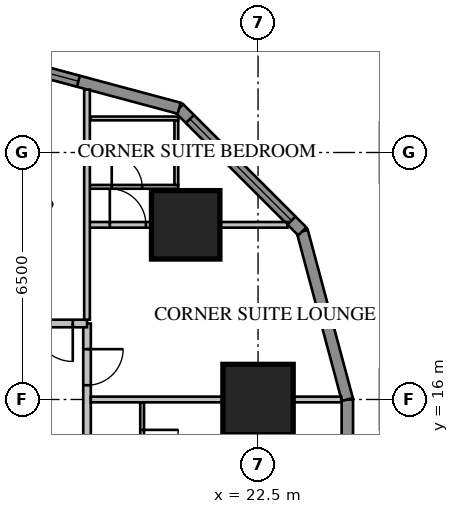
"""IFC4 building model, lengths in metres.
Left out: names, types, materials, properties, quantities, classifications, styles, units other than length and angle.
Written with IfcOpenShell. Run it as: python <this file> out.ifc"""

import sys

from ifc_helpers import new_model, si_unit, direction, frame, frame_2d, origin, origin_2d, place, context, subcontext, project, spatial, rectangle, extrude, element, fill, save


model = new_model("IFC4")
c1 = context("Model", 3, precision=1e-05, world=origin(), true_north=direction((0.0, 1.0)))
c2 = subcontext(c1, "Body", "Model", "MODEL_VIEW")
j1 = project(units=[si_unit("LENGTHUNIT", "METRE"), si_unit("PLANEANGLEUNIT", "RADIAN")], contexts=[c1])
p1 = place(None, origin())
s1 = spatial("IfcSite", under=j1, at=p1, CompositionType="ELEMENT")
p2 = place(p1, origin())
s2 = spatial("IfcBuilding", under=s1, at=p2, CompositionType="ELEMENT")
p3 = place(p2, frame((0.0, 0.0, 35.25)))
s3 = spatial("IfcBuildingStorey", under=s2, at=p3, CompositionType="ELEMENT", Elevation=35.25)
p4 = place(p3, frame((22.5, 16.0, 0.0), z_axis=(0.0, 0.0, 1.0), x_axis=(1.0, 0.0, 0.0)))
e1 = element("IfcColumn", 1, at=p4, inside=s3, PredefinedType="COLUMN", context=c2, shape_type="SweptSolid", body=[
    extrude(rectangle(XDim=1.85, YDim=1.85, at=origin_2d()), origin(), (0.0, 0.0, 1.0), 3.85),
])
p5 = place(p3, frame((20.596, 20.596, 0.0), z_axis=(0.0, 0.0, 1.0), x_axis=(1.0, 0.0, 0.0)))
e2 = element("IfcColumn", 2, at=p5, inside=s3, PredefinedType="COLUMN", context=c2, shape_type="SweptSolid", body=[
    extrude(rectangle(XDim=1.8, YDim=1.8, at=origin_2d()), origin(), (0.0, 0.0, 1.0), 3.85),
])
p6 = place(p3, frame((24.85, -16.0, 0.0), z_axis=(0.0, 0.0, 1.0), x_axis=(0.0, 1.0, 0.0)))
e3 = element("IfcWall", 3, at=p6, inside=s3, PredefinedType="SOLIDWALL", context=c2, shape_type="SweptSolid", body=[
    extrude(rectangle(XDim=32.0, YDim=0.3, at=frame_2d((16.0, 0.0))), origin(), (0.0, 0.0, 1.0), 3.65),
])
p7 = place(p6, frame((1.2, 0.0, 0.75)))
e4 = element("IfcOpeningElement", 4, at=p7, cuts=e3, PredefinedType="OPENING", context=c2, shape_type="SweptSolid", body=[
    extrude(rectangle(XDim=1.6, YDim=1.8, at=frame_2d((0.8, 0.9))), frame((0.0, 0.17, 0.0), z_axis=(0.0, -1.0, 0.0), x_axis=(1.0, 0.0, 0.0)), (0.0, 0.0, 1.0), 0.34),
])
p8 = place(p6, frame((5.2, 0.0, 0.75)))
e5 = element("IfcOpeningElement", 5, at=p8, cuts=e3, PredefinedType="OPENING", context=c2, shape_type="SweptSolid", body=[
    extrude(rectangle(XDim=1.6, YDim=1.8, at=frame_2d((0.8, 0.9))), frame((0.0, 0.17, 0.0), z_axis=(0.0, -1.0, 0.0), x_axis=(1.0, 0.0, 0.0)), (0.0, 0.0, 1.0), 0.34),
])
p9 = place(p6, frame((17.2, 0.0, 0.75)))
e6 = element("IfcOpeningElement", 6, at=p9, cuts=e3, PredefinedType="OPENING", context=c2, shape_type="SweptSolid", body=[
    extrude(rectangle(XDim=1.6, YDim=1.8, at=frame_2d((0.8, 0.9))), frame((0.0, 0.17, 0.0), z_axis=(0.0, -1.0, 0.0), x_axis=(1.0, 0.0, 0.0)), (0.0, 0.0, 1.0), 0.34),
])
p10 = place(p6, frame((21.2, 0.0, 0.75)))
e7 = element("IfcOpeningElement", 7, at=p10, cuts=e3, PredefinedType="OPENING", context=c2, shape_type="SweptSolid", body=[
    extrude(rectangle(XDim=1.6, YDim=1.8, at=frame_2d((0.8, 0.9))), frame((0.0, 0.17, 0.0), z_axis=(0.0, -1.0, 0.0), x_axis=(1.0, 0.0, 0.0)), (0.0, 0.0, 1.0), 0.34),
])
p11 = place(p6, frame((25.2, 0.0, 0.75)))
e8 = element("IfcOpeningElement", 8, at=p11, cuts=e3, PredefinedType="OPENING", context=c2, shape_type="SweptSolid", body=[
    extrude(rectangle(XDim=1.6, YDim=1.8, at=frame_2d((0.8, 0.9))), frame((0.0, 0.17, 0.0), z_axis=(0.0, -1.0, 0.0), x_axis=(1.0, 0.0, 0.0)), (0.0, 0.0, 1.0), 0.34),
])
p12 = place(p6, frame((29.2, 0.0, 0.75)))
e9 = element("IfcOpeningElement", 9, at=p12, cuts=e3, PredefinedType="OPENING", context=c2, shape_type="SweptSolid", body=[
    extrude(rectangle(XDim=1.6, YDim=1.8, at=frame_2d((0.8, 0.9))), frame((0.0, 0.17, 0.0), z_axis=(0.0, -1.0, 0.0), x_axis=(1.0, 0.0, 0.0)), (0.0, 0.0, 1.0), 0.34),
])
p13 = place(p6, frame((8.8, 0.0, 0.75)))
e10 = element("IfcOpeningElement", 10, at=p13, cuts=e3, PredefinedType="OPENING", context=c2, shape_type="SweptSolid", body=[
    extrude(rectangle(XDim=2.4, YDim=1.8, at=frame_2d((1.2, 0.9))), frame((0.0, 0.17, 0.0), z_axis=(0.0, -1.0, 0.0), x_axis=(1.0, 0.0, 0.0)), (0.0, 0.0, 1.0), 0.34),
])
p14 = place(p6, frame((13.812, 0.0, 0.0)))
e11 = element("IfcOpeningElement", 11, at=p14, cuts=e3, PredefinedType="OPENING", context=c2, shape_type="SweptSolid", body=[
    extrude(rectangle(XDim=1.0, YDim=2.4, at=frame_2d((0.5, 1.2))), frame((0.0, 0.17, 0.0), z_axis=(0.0, -1.0, 0.0), x_axis=(1.0, 0.0, 0.0)), (0.0, 0.0, 1.0), 0.34),
])
p15 = place(p3, frame((24.85, 16.0, 0.0), z_axis=(0.0, 0.0, 1.0), x_axis=(-0.258839972501, 0.965920218567, 0.0)))
e12 = element("IfcWall", 12, at=p15, inside=s3, PredefinedType="SOLIDWALL", context=c2, shape_type="SweptSolid", body=[
    extrude(rectangle(XDim=4.581, YDim=0.3, at=frame_2d((2.291, 0.0))), origin(), (0.0, 0.0, 1.0), 3.65),
])
p16 = place(p3, frame((23.664, 20.425, 0.0), z_axis=(0.0, 0.0, 1.0), x_axis=(-0.707106781187, 0.707106781187, 0.0)))
e13 = element("IfcWall", 13, at=p16, inside=s3, PredefinedType="SOLIDWALL", context=c2, shape_type="SweptSolid", body=[
    extrude(rectangle(XDim=4.581, YDim=0.3, at=frame_2d((2.291, 0.0))), origin(), (0.0, 0.0, 1.0), 3.65),
])
p17 = place(p16, frame((0.4, 0.0, 0.75)))
e14 = element("IfcOpeningElement", 14, at=p17, cuts=e13, PredefinedType="OPENING", context=c2, shape_type="SweptSolid", body=[
    extrude(rectangle(XDim=3.781, YDim=1.8, at=frame_2d((1.891, 0.9))), frame((0.0, 0.17, 0.0), z_axis=(0.0, -1.0, 0.0), x_axis=(1.0, 0.0, 0.0)), (0.0, 0.0, 1.0), 0.34),
])
p18 = place(p3, frame((20.425, 23.664, 0.0), z_axis=(0.0, 0.0, 1.0), x_axis=(-0.965920218567, 0.258839972501, 0.0)))
e15 = element("IfcWall", 15, at=p18, inside=s3, PredefinedType="SOLIDWALL", context=c2, shape_type="SweptSolid", body=[
    extrude(rectangle(XDim=4.581, YDim=0.3, at=frame_2d((2.291, 0.0))), origin(), (0.0, 0.0, 1.0), 3.65),
])
p19 = place(p18, frame((2.746, 0.0, 0.75)))
e16 = element("IfcOpeningElement", 16, at=p19, cuts=e15, PredefinedType="OPENING", context=c2, shape_type="SweptSolid", body=[
    extrude(rectangle(XDim=1.6, YDim=1.8, at=frame_2d((0.8, 0.9))), frame((0.0, 0.17, 0.0), z_axis=(0.0, -1.0, 0.0), x_axis=(1.0, 0.0, 0.0)), (0.0, 0.0, 1.0), 0.34),
])
p20 = place(p3, frame((18.0, -18.0, 0.0), z_axis=(0.0, 0.0, 1.0), x_axis=(0.0, 1.0, 0.0)))
e17 = element("IfcWall", 17, at=p20, inside=s3, PredefinedType="PARTITIONING", context=c2, shape_type="SweptSolid", body=[
    extrude(rectangle(XDim=36.0, YDim=0.2, at=frame_2d((18.0, 0.0))), origin(), (0.0, 0.0, 1.0), 3.65),
])
p21 = place(p20, frame((10.4, 0.0, 0.0)))
e18 = element("IfcOpeningElement", 18, at=p21, cuts=e17, PredefinedType="OPENING", context=c2, shape_type="SweptSolid", body=[
    extrude(rectangle(XDim=1.0, YDim=2.1, at=frame_2d((0.5, 1.05))), frame((0.0, 0.12, 0.0), z_axis=(0.0, -1.0, 0.0), x_axis=(1.0, 0.0, 0.0)), (0.0, 0.0, 1.0), 0.24),
])
p22 = place(p20, frame((0.375, 0.0, 0.0)))
e19 = element("IfcOpeningElement", 19, at=p22, cuts=e17, PredefinedType="OPENING", context=c2, shape_type="SweptSolid", body=[
    extrude(rectangle(XDim=1.0, YDim=2.1, at=frame_2d((0.5, 1.05))), frame((0.0, 0.12, 0.0), z_axis=(0.0, -1.0, 0.0), x_axis=(1.0, 0.0, 0.0)), (0.0, 0.0, 1.0), 0.24),
])
p23 = place(p20, frame((34.375, 0.0, 0.0)))
e20 = element("IfcOpeningElement", 20, at=p23, cuts=e17, PredefinedType="OPENING", context=c2, shape_type="SweptSolid", body=[
    extrude(rectangle(XDim=0.95, YDim=2.1, at=frame_2d((0.475, 1.05))), frame((0.0, 0.12, 0.0), z_axis=(0.0, -1.0, 0.0), x_axis=(1.0, 0.0, 0.0)), (0.0, 0.0, 1.0), 0.24),
])
p24 = place(p3, frame((19.45, -15.925, 0.0), z_axis=(0.0, 0.0, 1.0), x_axis=(0.0, 1.0, 0.0)))
e21 = element("IfcWall", 21, at=p24, inside=s3, PredefinedType="PARTITIONING", context=c2, shape_type="SweptSolid", body=[
    extrude(rectangle(XDim=31.85, YDim=0.1, at=frame_2d((15.925, 0.0))), origin(), (0.0, 0.0, 1.0), 3.65),
])
p25 = place(p24, frame((10.125, 0.0, 0.0)))
e22 = element("IfcOpeningElement", 22, at=p25, cuts=e21, PredefinedType="OPENING", context=c2, shape_type="SweptSolid", body=[
    extrude(rectangle(XDim=1.0, YDim=2.1, at=frame_2d((0.5, 1.05))), frame((0.0, 0.07, 0.0), z_axis=(0.0, -1.0, 0.0), x_axis=(1.0, 0.0, 0.0)), (0.0, 0.0, 1.0), 0.14),
])
p26 = place(p24, frame((8.3, 0.0, 0.0)))
e23 = element("IfcOpeningElement", 23, at=p26, cuts=e21, PredefinedType="OPENING", context=c2, shape_type="SweptSolid", body=[
    extrude(rectangle(XDim=0.8, YDim=2.1, at=frame_2d((0.4, 1.05))), frame((0.0, 0.07, 0.0), z_axis=(0.0, -1.0, 0.0), x_axis=(1.0, 0.0, 0.0)), (0.0, 0.0, 1.0), 0.14),
])
p27 = place(p24, frame((0.3, 0.0, 0.0)))
e24 = element("IfcOpeningElement", 24, at=p27, cuts=e21, PredefinedType="OPENING", context=c2, shape_type="SweptSolid", body=[
    extrude(rectangle(XDim=0.95, YDim=2.1, at=frame_2d((0.475, 1.05))), frame((0.0, 0.07, 0.0), z_axis=(0.0, -1.0, 0.0), x_axis=(1.0, 0.0, 0.0)), (0.0, 0.0, 1.0), 0.14),
])
p28 = place(p24, frame((6.175, 0.0, 0.0)))
e25 = element("IfcOpeningElement", 25, at=p28, cuts=e21, PredefinedType="OPENING", context=c2, shape_type="SweptSolid", body=[
    extrude(rectangle(XDim=0.95, YDim=2.1, at=frame_2d((0.475, 1.05))), frame((0.0, 0.07, 0.0), z_axis=(0.0, -1.0, 0.0), x_axis=(1.0, 0.0, 0.0)), (0.0, 0.0, 1.0), 0.14),
])
p29 = place(p24, frame((16.3, 0.0, 0.0)))
e26 = element("IfcOpeningElement", 26, at=p29, cuts=e21, PredefinedType="OPENING", context=c2, shape_type="SweptSolid", body=[
    extrude(rectangle(XDim=0.95, YDim=2.1, at=frame_2d((0.475, 1.05))), frame((0.0, 0.07, 0.0), z_axis=(0.0, -1.0, 0.0), x_axis=(1.0, 0.0, 0.0)), (0.0, 0.0, 1.0), 0.14),
])
p30 = place(p24, frame((22.175, 0.0, 0.0)))
e27 = element("IfcOpeningElement", 27, at=p30, cuts=e21, PredefinedType="OPENING", context=c2, shape_type="SweptSolid", body=[
    extrude(rectangle(XDim=0.95, YDim=2.1, at=frame_2d((0.475, 1.05))), frame((0.0, 0.07, 0.0), z_axis=(0.0, -1.0, 0.0), x_axis=(1.0, 0.0, 0.0)), (0.0, 0.0, 1.0), 0.14),
])
p31 = place(p24, frame((24.3, 0.0, 0.0)))
e28 = element("IfcOpeningElement", 28, at=p31, cuts=e21, PredefinedType="OPENING", context=c2, shape_type="SweptSolid", body=[
    extrude(rectangle(XDim=0.95, YDim=2.1, at=frame_2d((0.475, 1.05))), frame((0.0, 0.07, 0.0), z_axis=(0.0, -1.0, 0.0), x_axis=(1.0, 0.0, 0.0)), (0.0, 0.0, 1.0), 0.14),
])
p32 = place(p24, frame((30.175, 0.0, 0.0)))
e29 = element("IfcOpeningElement", 29, at=p32, cuts=e21, PredefinedType="OPENING", context=c2, shape_type="SweptSolid", body=[
    extrude(rectangle(XDim=0.95, YDim=2.1, at=frame_2d((0.475, 1.05))), frame((0.0, 0.07, 0.0), z_axis=(0.0, -1.0, 0.0), x_axis=(1.0, 0.0, 0.0)), (0.0, 0.0, 1.0), 0.14),
])
p33 = place(p3, frame((18.1, 16.0, 0.0), z_axis=(0.0, 0.0, 1.0), x_axis=(1.0, 0.0, 0.0)))
e30 = element("IfcWall", 30, at=p33, inside=s3, PredefinedType="PARTITIONING", context=c2, shape_type="SweptSolid", body=[
    extrude(rectangle(XDim=6.589, YDim=0.15, at=frame_2d((3.295, 0.0))), origin(), (0.0, 0.0, 1.0), 3.65),
])
p34 = place(p3, frame((18.065, 21.596, 0.0), z_axis=(0.0, 0.0, 1.0), x_axis=(1.0, 0.0, 0.0)))
e31 = element("IfcWall", 31, at=p34, inside=s3, PredefinedType="PARTITIONING", context=c2, shape_type="SweptSolid", body=[
    extrude(rectangle(XDim=2.335, YDim=0.1, at=frame_2d((1.167, 0.0))), origin(), (0.0, 0.0, 1.0), 3.65),
])
p35 = place(p34, frame((0.585, 0.0, 0.0)))
e32 = element("IfcOpeningElement", 32, at=p35, cuts=e31, PredefinedType="OPENING", context=c2, shape_type="SweptSolid", body=[
    extrude(rectangle(XDim=0.8, YDim=2.1, at=frame_2d((0.4, 1.05))), frame((0.0, 0.07, 0.0), z_axis=(0.0, -1.0, 0.0), x_axis=(1.0, 0.0, 0.0)), (0.0, 0.0, 1.0), 0.14),
])
p36 = place(p3, frame((20.35, 21.646, 0.0), z_axis=(0.0, 0.0, 1.0), x_axis=(0.0, 1.0, 0.0)))
e33 = element("IfcWall", 33, at=p36, inside=s3, PredefinedType="PARTITIONING", context=c2, shape_type="SweptSolid", body=[
    extrude(rectangle(XDim=1.7, YDim=0.1, at=frame_2d((0.85, 0.0))), origin(), (0.0, 0.0, 1.0), 3.65),
])
p37 = place(p3, frame((18.1, 23.396, 0.0), z_axis=(0.0, 0.0, 1.0), x_axis=(1.0, 0.0, 0.0)))
e34 = element("IfcWall", 34, at=p37, inside=s3, PredefinedType="PARTITIONING", context=c2, shape_type="SweptSolid", body=[
    extrude(rectangle(XDim=2.3, YDim=0.1, at=frame_2d((1.15, 0.0))), origin(), (0.0, 0.0, 1.0), 3.65),
])
p38 = place(p3, frame((18.065, 20.596, 0.0), z_axis=(0.0, 0.0, 1.0), x_axis=(1.0, 0.0, 0.0)))
e35 = element("IfcWall", 35, at=p38, inside=s3, PredefinedType="PARTITIONING", context=c2, shape_type="SweptSolid", body=[
    extrude(rectangle(XDim=5.209, YDim=0.15, at=frame_2d((2.604, 0.0))), origin(), (0.0, 0.0, 1.0), 3.65),
])
p39 = place(p38, frame((0.535, 0.0, 0.0)))
e36 = element("IfcOpeningElement", 36, at=p39, cuts=e35, PredefinedType="OPENING", context=c2, shape_type="SweptSolid", body=[
    extrude(rectangle(XDim=0.95, YDim=2.1, at=frame_2d((0.475, 1.05))), frame((0.0, 0.095, 0.0), z_axis=(0.0, -1.0, 0.0), x_axis=(1.0, 0.0, 0.0)), (0.0, 0.0, 1.0), 0.19),
])
p40 = place(p3, frame((18.0, 18.0, 0.0), z_axis=(0.0, 0.0, 1.0), x_axis=(-1.0, 0.0, 0.0)))
e37 = element("IfcWall", 37, at=p40, inside=s3, PredefinedType="PARTITIONING", context=c2, shape_type="SweptSolid", body=[
    extrude(rectangle(XDim=36.0, YDim=0.2, at=frame_2d((18.0, 0.0))), origin(), (0.0, 0.0, 1.0), 3.65),
])
p41 = place(p40, frame((10.4, 0.0, 0.0)))
e38 = element("IfcOpeningElement", 38, at=p41, cuts=e37, PredefinedType="OPENING", context=c2, shape_type="SweptSolid", body=[
    extrude(rectangle(XDim=1.0, YDim=2.1, at=frame_2d((0.5, 1.05))), frame((0.0, 0.12, 0.0), z_axis=(0.0, -1.0, 0.0), x_axis=(1.0, 0.0, 0.0)), (0.0, 0.0, 1.0), 0.24),
])
p42 = place(p40, frame((0.375, 0.0, 0.0)))
e39 = element("IfcOpeningElement", 39, at=p42, cuts=e37, PredefinedType="OPENING", context=c2, shape_type="SweptSolid", body=[
    extrude(rectangle(XDim=1.0, YDim=2.1, at=frame_2d((0.5, 1.05))), frame((0.0, 0.12, 0.0), z_axis=(0.0, -1.0, 0.0), x_axis=(1.0, 0.0, 0.0)), (0.0, 0.0, 1.0), 0.24),
])
p43 = place(p40, frame((34.375, 0.0, 0.0)))
e40 = element("IfcOpeningElement", 40, at=p43, cuts=e37, PredefinedType="OPENING", context=c2, shape_type="SweptSolid", body=[
    extrude(rectangle(XDim=0.95, YDim=2.1, at=frame_2d((0.475, 1.05))), frame((0.0, 0.12, 0.0), z_axis=(0.0, -1.0, 0.0), x_axis=(1.0, 0.0, 0.0)), (0.0, 0.0, 1.0), 0.24),
])
p44 = place(p3, frame((18.0, 18.1, 0.0), z_axis=(0.0, 0.0, 1.0), x_axis=(0.0, 1.0, 0.0)))
e41 = element("IfcWall", 41, at=p44, inside=s3, PredefinedType="PARTITIONING", context=c2, shape_type="SweptSolid", body=[
    extrude(rectangle(XDim=6.053, YDim=0.15, at=frame_2d((3.027, 0.0))), origin(), (0.0, 0.0, 1.0), 3.65),
])
p45 = place(p17, origin())
e42 = element("IfcWindow", 42, at=p45, inside=s3, PartitioningType="SINGLE_PANEL", PredefinedType="WINDOW", context=c2, shape_type="SweptSolid", body=[
    extrude(rectangle(XDim=3.781, YDim=1.8, at=frame_2d((1.891, 0.9))), frame((0.0, 0.03, 0.0), z_axis=(0.0, -1.0, 0.0), x_axis=(1.0, 0.0, 0.0)), (0.0, 0.0, 1.0), 0.06),
])
fill(e14, e42)
p46 = place(p19, origin())
e43 = element("IfcWindow", 43, at=p46, inside=s3, PartitioningType="SINGLE_PANEL", PredefinedType="WINDOW", context=c2, shape_type="SweptSolid", body=[
    extrude(rectangle(XDim=1.6, YDim=1.8, at=frame_2d((0.8, 0.9))), frame((0.0, 0.03, 0.0), z_axis=(0.0, -1.0, 0.0), x_axis=(1.0, 0.0, 0.0)), (0.0, 0.0, 1.0), 0.06),
])
fill(e16, e43)
p47 = place(p32, origin())
e44 = element("IfcDoor", 44, at=p47, inside=s3, OperationType="SINGLE_SWING_RIGHT", PredefinedType="DOOR", context=c2, shape_type="SweptSolid", body=[
    extrude(rectangle(XDim=0.95, YDim=2.1, at=frame_2d((0.475, 1.05))), frame((0.0, 0.025, 0.0), z_axis=(0.0, -1.0, 0.0), x_axis=(1.0, 0.0, 0.0)), (0.0, 0.0, 1.0), 0.05),
])
fill(e29, e44)
p48 = place(p23, origin())
e45 = element("IfcDoor", 45, at=p48, inside=s3, OperationType="SINGLE_SWING_RIGHT", PredefinedType="DOOR", context=c2, shape_type="SweptSolid", body=[
    extrude(rectangle(XDim=0.95, YDim=2.1, at=frame_2d((0.475, 1.05))), frame((0.0, 0.025, 0.0), z_axis=(0.0, -1.0, 0.0), x_axis=(1.0, 0.0, 0.0)), (0.0, 0.0, 1.0), 0.05),
])
fill(e20, e45)
p49 = place(p35, origin())
e46 = element("IfcDoor", 46, at=p49, inside=s3, OperationType="SINGLE_SWING_LEFT", PredefinedType="DOOR", context=c2, shape_type="SweptSolid", body=[
    extrude(rectangle(XDim=0.8, YDim=2.1, at=frame_2d((0.4, 1.05))), frame((0.0, 0.025, 0.0), z_axis=(0.0, -1.0, 0.0), x_axis=(1.0, 0.0, 0.0)), (0.0, 0.0, 1.0), 0.05),
])
fill(e32, e46)
p50 = place(p39, origin())
e47 = element("IfcDoor", 47, at=p50, inside=s3, OperationType="SINGLE_SWING_LEFT", PredefinedType="DOOR", context=c2, shape_type="SweptSolid", body=[
    extrude(rectangle(XDim=0.95, YDim=2.1, at=frame_2d((0.475, 1.05))), frame((0.0, 0.025, 0.0), z_axis=(0.0, -1.0, 0.0), x_axis=(1.0, 0.0, 0.0)), (0.0, 0.0, 1.0), 0.05),
])
fill(e36, e47)
p51 = place(p42, origin())
e48 = element("IfcDoor", 48, at=p51, inside=s3, OperationType="SINGLE_SWING_LEFT", PredefinedType="DOOR", context=c2, shape_type="SweptSolid", body=[
    extrude(rectangle(XDim=1.0, YDim=2.1, at=frame_2d((0.5, 1.05))), frame((0.0, 0.025, 0.0), z_axis=(0.0, -1.0, 0.0), x_axis=(1.0, 0.0, 0.0)), (0.0, 0.0, 1.0), 0.05),
])
fill(e39, e48)
save(model, sys.argv[1])
